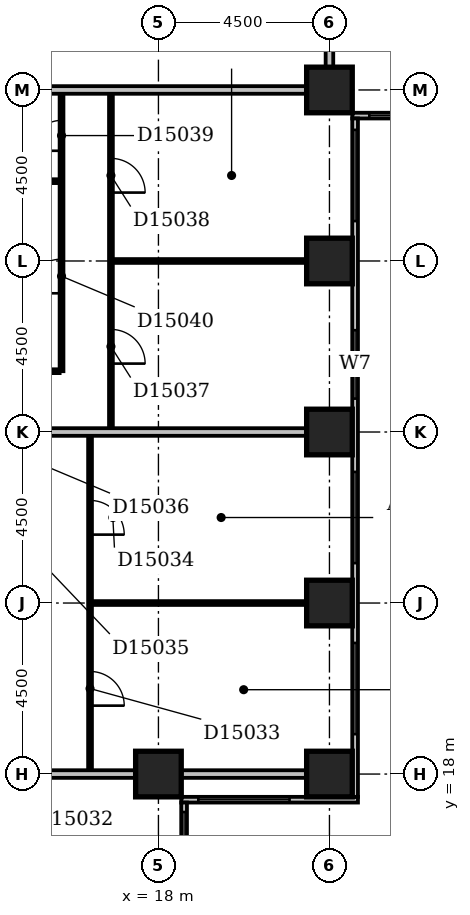
"""IFC4 building model, lengths in metres.
Left out: names, types, materials, properties, quantities, classifications, styles, units other than length and angle.
Written with IfcOpenShell. Run it as: python <this file> out.ifc"""

import sys

from ifc_helpers import new_model, si_unit, direction, frame, frame_2d, origin, origin_2d, place, context, subcontext, project, spatial, rectangle, extrude, element, fill, save


model = new_model("IFC4")
c1 = context("Model", 3, precision=1e-05, world=origin(), true_north=direction((0.0, 1.0)))
c2 = subcontext(c1, "Body", "Model", "MODEL_VIEW")
j1 = project(units=[si_unit("LENGTHUNIT", "METRE"), si_unit("PLANEANGLEUNIT", "RADIAN")], contexts=[c1])
p1 = place(None, origin())
s1 = spatial("IfcSite", under=j1, at=p1, CompositionType="ELEMENT")
p2 = place(p1, origin())
s2 = spatial("IfcBuilding", under=s1, at=p2, CompositionType="ELEMENT")
p3 = place(p2, frame((0.0, 0.0, 65.0)))
s3 = spatial("IfcBuildingStorey", under=s2, at=p3, CompositionType="ELEMENT", Elevation=65.0)
for number, where, z_axis, x_axis in (
    (1, (18.0, 18.0, -0.3), (0.0, 0.0, 1.0), (1.0, 0.0, 0.0)),
    (2, (22.5, 18.0, -0.3), (0.0, 0.0, 1.0), (1.0, 0.0, 0.0)),
    (3, (22.5, 22.5, -0.3), (0.0, 0.0, 1.0), (1.0, 0.0, 0.0)),
    (4, (22.5, 27.0, -0.3), (0.0, 0.0, 1.0), (1.0, 0.0, 0.0)),
    (5, (22.5, 31.5, -0.3), (0.0, 0.0, 1.0), (1.0, 0.0, 0.0)),
    (6, (22.5, 36.0, -0.3), (0.0, 0.0, 1.0), (1.0, 0.0, 0.0)),
):
    element("IfcColumn", number, at=place(p3, frame(where, z_axis=z_axis, x_axis=x_axis)), inside=s3, PredefinedType="COLUMN", context=c2, shape_type="SweptSolid", body=[
        extrude(rectangle(XDim=1.2, YDim=1.2, at=origin_2d()), origin(), (0.0, 0.0, 1.0), 3.6),
    ])
p4 = place(p3, frame((18.675, 8.4, 0.0), z_axis=(0.0, 0.0, 1.0), x_axis=(0.0, 1.0, 0.0)))
e7 = element("IfcWall", 7, at=p4, inside=s3, PredefinedType="STANDARD", context=c2, shape_type="SweptSolid", body=[
    extrude(rectangle(XDim=8.85, YDim=0.15, at=frame_2d((4.425, 0.0))), origin(), (0.0, 0.0, 1.0), 2.7),
])
p5 = place(p4, frame((1.65, 0.0, 0.6)))
e8 = element("IfcOpeningElement", 8, at=p5, cuts=e7, PredefinedType="OPENING", context=c2, shape_type="SweptSolid", body=[
    extrude(rectangle(XDim=2.4, YDim=1.8, at=frame_2d((1.2, 0.9))), frame((0.0, 0.087, 0.0), z_axis=(0.0, -1.0, 0.0), x_axis=(1.0, 0.0, 0.0)), (0.0, 0.0, 1.0), 0.174),
])
p6 = place(p4, frame((7.401, 0.0, 0.6)))
e9 = element("IfcOpeningElement", 9, at=p6, cuts=e7, PredefinedType="OPENING", context=c2, shape_type="SweptSolid", body=[
    extrude(rectangle(XDim=1.2, YDim=1.8, at=frame_2d((0.6, 0.9))), frame((0.0, 0.087, 0.0), z_axis=(0.0, -1.0, 0.0), x_axis=(1.0, 0.0, 0.0)), (0.0, 0.0, 1.0), 0.174),
])
p7 = place(p3, frame((18.6, 17.325, 0.0), z_axis=(0.0, 0.0, 1.0), x_axis=(1.0, 0.0, 0.0)))
e10 = element("IfcWall", 10, at=p7, inside=s3, PredefinedType="STANDARD", context=c2, shape_type="SweptSolid", body=[
    extrude(rectangle(XDim=4.65, YDim=0.15, at=frame_2d((2.325, 0.0))), origin(), (0.0, 0.0, 1.0), 2.7),
])
p8 = place(p7, frame((0.45, 0.0, 0.6)))
e11 = element("IfcOpeningElement", 11, at=p8, cuts=e10, PredefinedType="OPENING", context=c2, shape_type="SweptSolid", body=[
    extrude(rectangle(XDim=2.4, YDim=1.8, at=frame_2d((1.2, 0.9))), frame((0.0, 0.087, 0.0), z_axis=(0.0, -1.0, 0.0), x_axis=(1.0, 0.0, 0.0)), (0.0, 0.0, 1.0), 0.174),
])
p9 = place(p3, frame((23.175, 17.4, 0.0), z_axis=(0.0, 0.0, 1.0), x_axis=(0.0, 1.0, 0.0)))
e12 = element("IfcWall", 12, at=p9, inside=s3, PredefinedType="STANDARD", context=c2, shape_type="SweptSolid", body=[
    extrude(rectangle(XDim=17.85, YDim=0.15, at=frame_2d((8.925, 0.0))), origin(), (0.0, 0.0, 1.0), 2.7),
])
p10 = place(p9, frame((1.65, 0.0, 0.6)))
e13 = element("IfcOpeningElement", 13, at=p10, cuts=e12, PredefinedType="OPENING", context=c2, shape_type="SweptSolid", body=[
    extrude(rectangle(XDim=2.4, YDim=1.8, at=frame_2d((1.2, 0.9))), frame((0.0, 0.087, 0.0), z_axis=(0.0, -1.0, 0.0), x_axis=(1.0, 0.0, 0.0)), (0.0, 0.0, 1.0), 0.174),
])
p11 = place(p9, frame((6.15, 0.0, 0.6)))
e14 = element("IfcOpeningElement", 14, at=p11, cuts=e12, PredefinedType="OPENING", context=c2, shape_type="SweptSolid", body=[
    extrude(rectangle(XDim=2.4, YDim=1.8, at=frame_2d((1.2, 0.9))), frame((0.0, 0.087, 0.0), z_axis=(0.0, -1.0, 0.0), x_axis=(1.0, 0.0, 0.0)), (0.0, 0.0, 1.0), 0.174),
])
p12 = place(p9, frame((10.479, 0.0, 0.6)))
e15 = element("IfcOpeningElement", 15, at=p12, cuts=e12, PredefinedType="OPENING", context=c2, shape_type="SweptSolid", body=[
    extrude(rectangle(XDim=1.8, YDim=1.8, at=frame_2d((0.9, 0.9))), frame((0.0, 0.087, 0.0), z_axis=(0.0, -1.0, 0.0), x_axis=(1.0, 0.0, 0.0)), (0.0, 0.0, 1.0), 0.174),
])
p13 = place(p9, frame((15.15, 0.0, 0.6)))
e16 = element("IfcOpeningElement", 16, at=p13, cuts=e12, PredefinedType="OPENING", context=c2, shape_type="SweptSolid", body=[
    extrude(rectangle(XDim=2.4, YDim=1.8, at=frame_2d((1.2, 0.9))), frame((0.0, 0.087, 0.0), z_axis=(0.0, -1.0, 0.0), x_axis=(1.0, 0.0, 0.0)), (0.0, 0.0, 1.0), 0.174),
])
p14 = place(p3, frame((23.1, 35.325, 0.0), z_axis=(0.0, 0.0, 1.0), x_axis=(1.0, 0.0, 0.0)))
e17 = element("IfcWall", 17, at=p14, inside=s3, PredefinedType="STANDARD", context=c2, shape_type="SweptSolid", body=[
    extrude(rectangle(XDim=45.15, YDim=0.15, at=frame_2d((22.575, 0.0))), origin(), (0.0, 0.0, 1.0), 2.7),
])
p15 = place(p14, frame((0.45, 0.0, 0.6)))
e18 = element("IfcOpeningElement", 18, at=p15, cuts=e17, PredefinedType="OPENING", context=c2, shape_type="SweptSolid", body=[
    extrude(rectangle(XDim=2.4, YDim=1.8, at=frame_2d((1.2, 0.9))), frame((0.0, 0.087, 0.0), z_axis=(0.0, -1.0, 0.0), x_axis=(1.0, 0.0, 0.0)), (0.0, 0.0, 1.0), 0.174),
])
p16 = place(p14, frame((4.95, 0.0, 0.6)))
e19 = element("IfcOpeningElement", 19, at=p16, cuts=e17, PredefinedType="OPENING", context=c2, shape_type="SweptSolid", body=[
    extrude(rectangle(XDim=2.4, YDim=1.8, at=frame_2d((1.2, 0.9))), frame((0.0, 0.087, 0.0), z_axis=(0.0, -1.0, 0.0), x_axis=(1.0, 0.0, 0.0)), (0.0, 0.0, 1.0), 0.174),
])
p17 = place(p14, frame((10.877, 0.0, 0.6)))
e20 = element("IfcOpeningElement", 20, at=p17, cuts=e17, PredefinedType="OPENING", context=c2, shape_type="SweptSolid", body=[
    extrude(rectangle(XDim=1.2, YDim=1.8, at=frame_2d((0.6, 0.9))), frame((0.0, 0.087, 0.0), z_axis=(0.0, -1.0, 0.0), x_axis=(1.0, 0.0, 0.0)), (0.0, 0.0, 1.0), 0.174),
])
p18 = place(p14, frame((13.823, 0.0, 0.6)))
e21 = element("IfcOpeningElement", 21, at=p18, cuts=e17, PredefinedType="OPENING", context=c2, shape_type="SweptSolid", body=[
    extrude(rectangle(XDim=1.2, YDim=1.8, at=frame_2d((0.6, 0.9))), frame((0.0, 0.087, 0.0), z_axis=(0.0, -1.0, 0.0), x_axis=(1.0, 0.0, 0.0)), (0.0, 0.0, 1.0), 0.174),
])
p19 = place(p14, frame((18.45, 0.0, 0.6)))
e22 = element("IfcOpeningElement", 22, at=p19, cuts=e17, PredefinedType="OPENING", context=c2, shape_type="SweptSolid", body=[
    extrude(rectangle(XDim=2.4, YDim=1.8, at=frame_2d((1.2, 0.9))), frame((0.0, 0.087, 0.0), z_axis=(0.0, -1.0, 0.0), x_axis=(1.0, 0.0, 0.0)), (0.0, 0.0, 1.0), 0.174),
])
p20 = place(p14, frame((22.95, 0.0, 0.6)))
e23 = element("IfcOpeningElement", 23, at=p20, cuts=e17, PredefinedType="OPENING", context=c2, shape_type="SweptSolid", body=[
    extrude(rectangle(XDim=2.4, YDim=1.8, at=frame_2d((1.2, 0.9))), frame((0.0, 0.087, 0.0), z_axis=(0.0, -1.0, 0.0), x_axis=(1.0, 0.0, 0.0)), (0.0, 0.0, 1.0), 0.174),
])
p21 = place(p14, frame((27.45, 0.0, 0.6)))
e24 = element("IfcOpeningElement", 24, at=p21, cuts=e17, PredefinedType="OPENING", context=c2, shape_type="SweptSolid", body=[
    extrude(rectangle(XDim=2.4, YDim=1.8, at=frame_2d((1.2, 0.9))), frame((0.0, 0.087, 0.0), z_axis=(0.0, -1.0, 0.0), x_axis=(1.0, 0.0, 0.0)), (0.0, 0.0, 1.0), 0.174),
])
p22 = place(p14, frame((31.95, 0.0, 0.6)))
e25 = element("IfcOpeningElement", 25, at=p22, cuts=e17, PredefinedType="OPENING", context=c2, shape_type="SweptSolid", body=[
    extrude(rectangle(XDim=2.4, YDim=1.8, at=frame_2d((1.2, 0.9))), frame((0.0, 0.087, 0.0), z_axis=(0.0, -1.0, 0.0), x_axis=(1.0, 0.0, 0.0)), (0.0, 0.0, 1.0), 0.174),
])
p23 = place(p14, frame((36.45, 0.0, 0.6)))
e26 = element("IfcOpeningElement", 26, at=p23, cuts=e17, PredefinedType="OPENING", context=c2, shape_type="SweptSolid", body=[
    extrude(rectangle(XDim=2.4, YDim=1.8, at=frame_2d((1.2, 0.9))), frame((0.0, 0.087, 0.0), z_axis=(0.0, -1.0, 0.0), x_axis=(1.0, 0.0, 0.0)), (0.0, 0.0, 1.0), 0.174),
])
p24 = place(p14, frame((41.403, 0.0, 0.6)))
e27 = element("IfcOpeningElement", 27, at=p24, cuts=e17, PredefinedType="OPENING", context=c2, shape_type="SweptSolid", body=[
    extrude(rectangle(XDim=2.1, YDim=1.8, at=frame_2d((1.05, 0.9))), frame((0.0, 0.087, 0.0), z_axis=(0.0, -1.0, 0.0), x_axis=(1.0, 0.0, 0.0)), (0.0, 0.0, 1.0), 0.174),
])
p25 = place(p3, frame((9.1, 18.0, 0.0), z_axis=(0.0, 0.0, 1.0), x_axis=(1.0, 0.0, 0.0)))
e28 = element("IfcWall", 28, at=p25, inside=s3, PredefinedType="PARTITIONING", context=c2, shape_type="SweptSolid", body=[
    extrude(rectangle(XDim=8.3, YDim=0.2, at=frame_2d((4.15, 0.0))), origin(), (0.0, 0.0, 1.0), 2.6),
])
p26 = place(p3, frame((18.6, 18.0, 0.0), z_axis=(0.0, 0.0, 1.0), x_axis=(1.0, 0.0, 0.0)))
e29 = element("IfcWall", 29, at=p26, inside=s3, PredefinedType="PARTITIONING", context=c2, shape_type="SweptSolid", body=[
    extrude(rectangle(XDim=3.3, YDim=0.2, at=frame_2d((1.65, 0.0))), origin(), (0.0, 0.0, 1.0), 2.7),
])
p27 = place(p3, frame((16.2, 18.1, 0.0), z_axis=(0.0, 0.0, 1.0), x_axis=(0.0, 1.0, 0.0)))
e30 = element("IfcWall", 30, at=p27, inside=s3, PredefinedType="PARTITIONING", context=c2, shape_type="SweptSolid", body=[
    extrude(rectangle(XDim=8.8, YDim=0.1, at=frame_2d((4.4, 0.0))), origin(), (0.0, 0.0, 1.0), 3.3),
])
p28 = place(p27, frame((1.7, 0.0, 0.0)))
e31 = element("IfcOpeningElement", 31, at=p28, cuts=e30, PredefinedType="OPENING", context=c2, shape_type="SweptSolid", body=[
    extrude(rectangle(XDim=0.9, YDim=2.1, at=frame_2d((0.45, 1.05))), frame((0.0, 0.062, 0.0), z_axis=(0.0, -1.0, 0.0), x_axis=(1.0, 0.0, 0.0)), (0.0, 0.0, 1.0), 0.124),
])
p29 = place(p27, frame((6.2, 0.0, 0.0)))
e32 = element("IfcOpeningElement", 32, at=p29, cuts=e30, PredefinedType="OPENING", context=c2, shape_type="SweptSolid", body=[
    extrude(rectangle(XDim=0.9, YDim=2.1, at=frame_2d((0.45, 1.05))), frame((0.0, 0.062, 0.0), z_axis=(0.0, -1.0, 0.0), x_axis=(1.0, 0.0, 0.0)), (0.0, 0.0, 1.0), 0.124),
])
p30 = place(p3, frame((16.25, 22.5, 0.0), z_axis=(0.0, 0.0, 1.0), x_axis=(1.0, 0.0, 0.0)))
e33 = element("IfcWall", 33, at=p30, inside=s3, PredefinedType="PARTITIONING", context=c2, shape_type="SweptSolid", body=[
    extrude(rectangle(XDim=5.65, YDim=0.1, at=frame_2d((2.825, 0.0))), origin(), (0.0, 0.0, 1.0), 3.3),
])
p31 = place(p3, frame((9.1, 27.0, 0.0), z_axis=(0.0, 0.0, 1.0), x_axis=(1.0, 0.0, 0.0)))
e34 = element("IfcWall", 34, at=p31, inside=s3, PredefinedType="PARTITIONING", context=c2, shape_type="SweptSolid", body=[
    extrude(rectangle(XDim=12.8, YDim=0.2, at=frame_2d((6.4, 0.0))), origin(), (0.0, 0.0, 1.0), 2.7),
])
p32 = place(p3, frame((16.75, 27.1, 0.0), z_axis=(0.0, 0.0, 1.0), x_axis=(0.0, 1.0, 0.0)))
e35 = element("IfcWall", 35, at=p32, inside=s3, PredefinedType="PARTITIONING", context=c2, shape_type="SweptSolid", body=[
    extrude(rectangle(XDim=8.8, YDim=0.1, at=frame_2d((4.4, 0.0))), origin(), (0.0, 0.0, 1.0), 3.3),
])
p33 = place(p32, frame((1.7, 0.0, 0.0)))
e36 = element("IfcOpeningElement", 36, at=p33, cuts=e35, PredefinedType="OPENING", context=c2, shape_type="SweptSolid", body=[
    extrude(rectangle(XDim=0.9, YDim=2.1, at=frame_2d((0.45, 1.05))), frame((0.0, 0.062, 0.0), z_axis=(0.0, -1.0, 0.0), x_axis=(1.0, 0.0, 0.0)), (0.0, 0.0, 1.0), 0.124),
])
p34 = place(p32, frame((6.2, 0.0, 0.0)))
e37 = element("IfcOpeningElement", 37, at=p34, cuts=e35, PredefinedType="OPENING", context=c2, shape_type="SweptSolid", body=[
    extrude(rectangle(XDim=0.9, YDim=2.1, at=frame_2d((0.45, 1.05))), frame((0.0, 0.062, 0.0), z_axis=(0.0, -1.0, 0.0), x_axis=(1.0, 0.0, 0.0)), (0.0, 0.0, 1.0), 0.124),
])
p35 = place(p3, frame((9.1, 28.6, 0.0), z_axis=(0.0, 0.0, 1.0), x_axis=(1.0, 0.0, 0.0)))
e38 = element("IfcWall", 38, at=p35, inside=s3, PredefinedType="PARTITIONING", context=c2, shape_type="SweptSolid", body=[
    extrude(rectangle(XDim=6.3, YDim=0.1, at=frame_2d((3.15, 0.0))), origin(), (0.0, 0.0, 1.0), 3.3),
])
p36 = place(p3, frame((15.45, 28.6, 0.0), z_axis=(0.0, 0.0, 1.0), x_axis=(0.0, 1.0, 0.0)))
e39 = element("IfcWall", 39, at=p36, inside=s3, PredefinedType="PARTITIONING", context=c2, shape_type="SweptSolid", body=[
    extrude(rectangle(XDim=7.3, YDim=0.1, at=frame_2d((3.65, 0.0))), origin(), (0.0, 0.0, 1.0), 3.3),
])
p37 = place(p36, frame((5.8, 0.0, 0.0)))
e40 = element("IfcOpeningElement", 40, at=p37, cuts=e39, PredefinedType="OPENING", context=c2, shape_type="SweptSolid", body=[
    extrude(rectangle(XDim=0.8, YDim=2.1, at=frame_2d((0.4, 1.05))), frame((0.0, 0.062, 0.0), z_axis=(0.0, -1.0, 0.0), x_axis=(1.0, 0.0, 0.0)), (0.0, 0.0, 1.0), 0.124),
])
p38 = place(p36, frame((2.05, 0.0, 0.0)))
e41 = element("IfcOpeningElement", 41, at=p38, cuts=e39, PredefinedType="OPENING", context=c2, shape_type="SweptSolid", body=[
    extrude(rectangle(XDim=0.9, YDim=2.1, at=frame_2d((0.45, 1.05))), frame((0.0, 0.062, 0.0), z_axis=(0.0, -1.0, 0.0), x_axis=(1.0, 0.0, 0.0)), (0.0, 0.0, 1.0), 0.124),
])
p39 = place(p3, frame((16.8, 31.5, 0.0), z_axis=(0.0, 0.0, 1.0), x_axis=(1.0, 0.0, 0.0)))
e42 = element("IfcWall", 42, at=p39, inside=s3, PredefinedType="PARTITIONING", context=c2, shape_type="SweptSolid", body=[
    extrude(rectangle(XDim=5.1, YDim=0.1, at=frame_2d((2.55, 0.0))), origin(), (0.0, 0.0, 1.0), 3.3),
])
p40 = place(p3, frame((9.1, 33.6, 0.0), z_axis=(0.0, 0.0, 1.0), x_axis=(1.0, 0.0, 0.0)))
e43 = element("IfcWall", 43, at=p40, inside=s3, PredefinedType="PLUMBINGWALL", context=c2, shape_type="SweptSolid", body=[
    extrude(rectangle(XDim=6.3, YDim=0.1, at=frame_2d((3.15, 0.0))), origin(), (0.0, 0.0, 1.0), 3.3),
])
p41 = place(p3, frame((9.1, 36.0, 0.0), z_axis=(0.0, 0.0, 1.0), x_axis=(1.0, 0.0, 0.0)))
e44 = element("IfcWall", 44, at=p41, inside=s3, PredefinedType="PARTITIONING", context=c2, shape_type="SweptSolid", body=[
    extrude(rectangle(XDim=12.8, YDim=0.2, at=frame_2d((6.4, 0.0))), origin(), (0.0, 0.0, 1.0), 2.4),
])
p42 = place(p3, frame((22.5, 36.6, 0.0), z_axis=(0.0, 0.0, 1.0), x_axis=(0.0, 1.0, 0.0)))
e45 = element("IfcWall", 45, at=p42, inside=s3, PredefinedType="PARTITIONING", context=c2, shape_type="SweptSolid", body=[
    extrude(rectangle(XDim=12.8, YDim=0.2, at=frame_2d((6.4, 0.0))), origin(), (0.0, 0.0, 1.0), 3.3),
])
p43 = place(p6, origin())
e46 = element("IfcWindow", 46, at=p43, inside=s3, PartitioningType="SINGLE_PANEL", PredefinedType="WINDOW", context=c2, shape_type="SweptSolid", body=[
    extrude(rectangle(XDim=1.2, YDim=1.8, at=frame_2d((0.6, 0.9))), frame((0.0, 0.03, 0.0), z_axis=(0.0, -1.0, 0.0), x_axis=(1.0, 0.0, 0.0)), (0.0, 0.0, 1.0), 0.06),
])
fill(e9, e46)
p44 = place(p8, origin())
e47 = element("IfcWindow", 47, at=p44, inside=s3, PartitioningType="SINGLE_PANEL", PredefinedType="WINDOW", context=c2, shape_type="SweptSolid", body=[
    extrude(rectangle(XDim=2.4, YDim=1.8, at=frame_2d((1.2, 0.9))), frame((0.0, 0.03, 0.0), z_axis=(0.0, -1.0, 0.0), x_axis=(1.0, 0.0, 0.0)), (0.0, 0.0, 1.0), 0.06),
])
fill(e11, e47)
p45 = place(p10, origin())
e48 = element("IfcWindow", 48, at=p45, inside=s3, PartitioningType="SINGLE_PANEL", PredefinedType="WINDOW", context=c2, shape_type="SweptSolid", body=[
    extrude(rectangle(XDim=2.4, YDim=1.8, at=frame_2d((1.2, 0.9))), frame((0.0, 0.03, 0.0), z_axis=(0.0, -1.0, 0.0), x_axis=(1.0, 0.0, 0.0)), (0.0, 0.0, 1.0), 0.06),
])
fill(e13, e48)
p46 = place(p11, origin())
e49 = element("IfcWindow", 49, at=p46, inside=s3, PartitioningType="SINGLE_PANEL", PredefinedType="WINDOW", context=c2, shape_type="SweptSolid", body=[
    extrude(rectangle(XDim=2.4, YDim=1.8, at=frame_2d((1.2, 0.9))), frame((0.0, 0.03, 0.0), z_axis=(0.0, -1.0, 0.0), x_axis=(1.0, 0.0, 0.0)), (0.0, 0.0, 1.0), 0.06),
])
fill(e14, e49)
p47 = place(p12, origin())
e50 = element("IfcWindow", 50, at=p47, inside=s3, PartitioningType="SINGLE_PANEL", PredefinedType="WINDOW", context=c2, shape_type="SweptSolid", body=[
    extrude(rectangle(XDim=1.8, YDim=1.8, at=frame_2d((0.9, 0.9))), frame((0.0, 0.03, 0.0), z_axis=(0.0, -1.0, 0.0), x_axis=(1.0, 0.0, 0.0)), (0.0, 0.0, 1.0), 0.06),
])
fill(e15, e50)
p48 = place(p13, origin())
e51 = element("IfcWindow", 51, at=p48, inside=s3, PartitioningType="SINGLE_PANEL", PredefinedType="WINDOW", context=c2, shape_type="SweptSolid", body=[
    extrude(rectangle(XDim=2.4, YDim=1.8, at=frame_2d((1.2, 0.9))), frame((0.0, 0.03, 0.0), z_axis=(0.0, -1.0, 0.0), x_axis=(1.0, 0.0, 0.0)), (0.0, 0.0, 1.0), 0.06),
])
fill(e16, e51)
p49 = place(p15, origin())
e52 = element("IfcWindow", 52, at=p49, inside=s3, PartitioningType="SINGLE_PANEL", PredefinedType="WINDOW", context=c2, shape_type="SweptSolid", body=[
    extrude(rectangle(XDim=2.4, YDim=1.8, at=frame_2d((1.2, 0.9))), frame((0.0, 0.03, 0.0), z_axis=(0.0, -1.0, 0.0), x_axis=(1.0, 0.0, 0.0)), (0.0, 0.0, 1.0), 0.06),
])
fill(e18, e52)
p50 = place(p28, frame((0.9, 0.0, 0.0), z_axis=(0.0, 0.0, 1.0), x_axis=(-1.0, 0.0, 0.0)))
e53 = element("IfcDoor", 53, at=p50, inside=s3, OperationType="SINGLE_SWING_RIGHT", PredefinedType="DOOR", context=c2, shape_type="SweptSolid", body=[
    extrude(rectangle(XDim=0.9, YDim=2.1, at=frame_2d((0.45, 1.05))), frame((0.0, 0.025, 0.0), z_axis=(0.0, -1.0, 0.0), x_axis=(1.0, 0.0, 0.0)), (0.0, 0.0, 1.0), 0.05),
])
fill(e31, e53)
p51 = place(p29, frame((0.9, 0.0, 0.0), z_axis=(0.0, 0.0, 1.0), x_axis=(-1.0, 0.0, 0.0)))
e54 = element("IfcDoor", 54, at=p51, inside=s3, OperationType="SINGLE_SWING_RIGHT", PredefinedType="DOOR", context=c2, shape_type="SweptSolid", body=[
    extrude(rectangle(XDim=0.9, YDim=2.1, at=frame_2d((0.45, 1.05))), frame((0.0, 0.025, 0.0), z_axis=(0.0, -1.0, 0.0), x_axis=(1.0, 0.0, 0.0)), (0.0, 0.0, 1.0), 0.05),
])
fill(e32, e54)
p52 = place(p33, frame((0.9, 0.0, 0.0), z_axis=(0.0, 0.0, 1.0), x_axis=(-1.0, 0.0, 0.0)))
e55 = element("IfcDoor", 55, at=p52, inside=s3, OperationType="SINGLE_SWING_RIGHT", PredefinedType="DOOR", context=c2, shape_type="SweptSolid", body=[
    extrude(rectangle(XDim=0.9, YDim=2.1, at=frame_2d((0.45, 1.05))), frame((0.0, 0.025, 0.0), z_axis=(0.0, -1.0, 0.0), x_axis=(1.0, 0.0, 0.0)), (0.0, 0.0, 1.0), 0.05),
])
fill(e36, e55)
p53 = place(p34, frame((0.9, 0.0, 0.0), z_axis=(0.0, 0.0, 1.0), x_axis=(-1.0, 0.0, 0.0)))
e56 = element("IfcDoor", 56, at=p53, inside=s3, OperationType="SINGLE_SWING_RIGHT", PredefinedType="DOOR", context=c2, shape_type="SweptSolid", body=[
    extrude(rectangle(XDim=0.9, YDim=2.1, at=frame_2d((0.45, 1.05))), frame((0.0, 0.025, 0.0), z_axis=(0.0, -1.0, 0.0), x_axis=(1.0, 0.0, 0.0)), (0.0, 0.0, 1.0), 0.05),
])
fill(e37, e56)
p54 = place(p37, origin())
e57 = element("IfcDoor", 57, at=p54, inside=s3, OperationType="SINGLE_SWING_LEFT", PredefinedType="DOOR", context=c2, shape_type="SweptSolid", body=[
    extrude(rectangle(XDim=0.8, YDim=2.1, at=frame_2d((0.4, 1.05))), frame((0.0, 0.025, 0.0), z_axis=(0.0, -1.0, 0.0), x_axis=(1.0, 0.0, 0.0)), (0.0, 0.0, 1.0), 0.05),
])
fill(e40, e57)
p55 = place(p38, origin())
e58 = element("IfcDoor", 58, at=p55, inside=s3, OperationType="SINGLE_SWING_LEFT", PredefinedType="DOOR", context=c2, shape_type="SweptSolid", body=[
    extrude(rectangle(XDim=0.9, YDim=2.1, at=frame_2d((0.45, 1.05))), frame((0.0, 0.025, 0.0), z_axis=(0.0, -1.0, 0.0), x_axis=(1.0, 0.0, 0.0)), (0.0, 0.0, 1.0), 0.05),
])
fill(e41, e58)
save(model, sys.argv[1])
